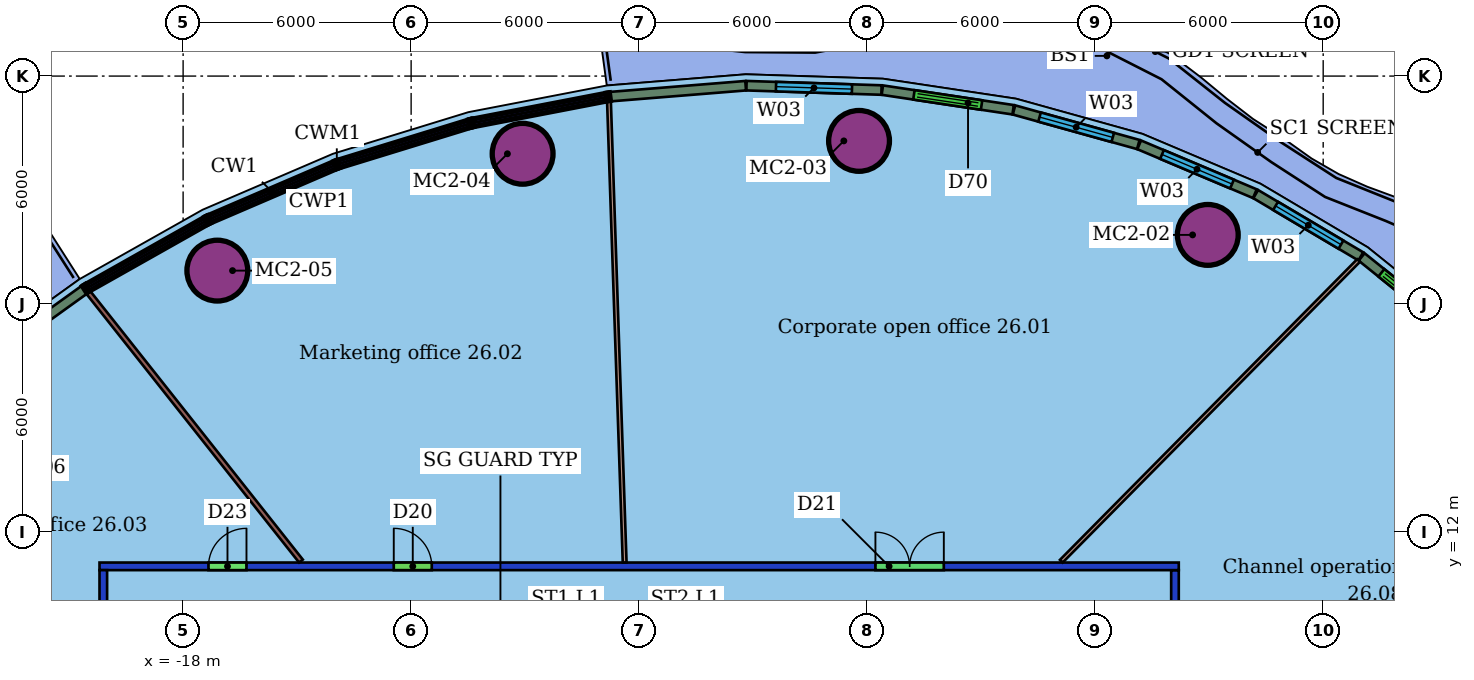
"""IFC4 building model, lengths in metres.
Left out: names, types, materials, properties, quantities, classifications, styles, units other than length and angle.
Written with IfcOpenShell. Run it as: python <this file> out.ifc"""

import sys

from ifc_helpers import new_model, si_unit, direction, frame, frame_2d, origin, origin_2d, place, context, subcontext, project, spatial, rectangle, hollow_circle, extrude, element, fill, save


model = new_model("IFC4")
c1 = context("Model", 3, precision=1e-05, world=origin(), true_north=direction((0.0, 1.0)))
c2 = subcontext(c1, "Body", "Model", "MODEL_VIEW")
j1 = project(units=[si_unit("LENGTHUNIT", "METRE"), si_unit("PLANEANGLEUNIT", "RADIAN")], contexts=[c1])
p1 = place(None, origin())
s1 = spatial("IfcSite", under=j1, at=p1, CompositionType="ELEMENT")
p2 = place(p1, origin())
s2 = spatial("IfcBuilding", under=s1, at=p2, CompositionType="ELEMENT")
p3 = place(p2, frame((0.0, 0.0, 113.8)))
s3 = spatial("IfcBuildingStorey", under=s2, at=p3, CompositionType="ELEMENT", Elevation=113.8)
for number, where, z_axis, x_axis in (
    (1, (8.963, 19.821, 0.0), (0.0, 0.0, 1.0), (1.0, 0.0, 0.0)),
    (2, (-0.213, 22.294, 0.0), (0.0, 0.0, 1.0), (1.0, 0.0, 0.0)),
    (3, (-9.066, 21.956, 0.0), (0.0, 0.0, 1.0), (1.0, 0.0, 0.0)),
    (4, (-17.1, 18.881, 0.0), (0.0, 0.0, 1.0), (1.0, 0.0, 0.0)),
):
    element("IfcColumn", number, at=place(p3, frame(where, z_axis=z_axis, x_axis=x_axis)), inside=s3, PredefinedType="COLUMN", context=c2, shape_type="SweptSolid", body=[
        extrude(hollow_circle(Radius=0.8, WallThickness=0.055, at=origin_2d()), origin(), (0.0, 0.0, 1.0), 3.45),
    ])
p4 = place(p3, frame((-20.1, -11.0, 0.0), z_axis=(0.0, 0.0, 1.0), x_axis=(0.0, 1.0, 0.0)))
e5 = element("IfcWall", 5, at=p4, inside=s3, PredefinedType="PARTITIONING", context=c2, shape_type="SweptSolid", body=[
    extrude(rectangle(XDim=22.0, YDim=0.2, at=frame_2d((11.0, 0.0))), origin(), (0.0, 0.0, 1.0), 3.0),
])
p5 = place(p4, frame((9.103, 0.0, 0.0)))
e6 = element("IfcOpeningElement", 6, at=p5, cuts=e5, PredefinedType="OPENING", context=c2, shape_type="SweptSolid", body=[
    extrude(rectangle(XDim=1.8, YDim=2.1, at=frame_2d((0.9, 1.05))), frame((0.0, 0.11, 0.0), z_axis=(0.0, -1.0, 0.0), x_axis=(1.0, 0.0, 0.0)), (0.0, 0.0, 1.0), 0.22),
])
p6 = place(p3, frame((-20.2, 11.1, 0.0), z_axis=(0.0, 0.0, 1.0), x_axis=(1.0, 0.0, 0.0)))
e7 = element("IfcWall", 7, at=p6, inside=s3, PredefinedType="PARTITIONING", context=c2, shape_type="SweptSolid", body=[
    extrude(rectangle(XDim=28.4, YDim=0.2, at=frame_2d((14.2, 0.0))), origin(), (0.0, 0.0, 1.0), 3.0),
])
p7 = place(p6, frame((20.417, 0.0, 0.0)))
e8 = element("IfcOpeningElement", 8, at=p7, cuts=e7, PredefinedType="OPENING", context=c2, shape_type="SweptSolid", body=[
    extrude(rectangle(XDim=1.8, YDim=2.1, at=frame_2d((0.9, 1.05))), frame((0.0, 0.11, 0.0), z_axis=(0.0, -1.0, 0.0), x_axis=(1.0, 0.0, 0.0)), (0.0, 0.0, 1.0), 0.22),
])
p8 = place(p6, frame((7.743, 0.0, 0.0)))
e9 = element("IfcOpeningElement", 9, at=p8, cuts=e7, PredefinedType="OPENING", context=c2, shape_type="SweptSolid", body=[
    extrude(rectangle(XDim=1.0, YDim=2.1, at=frame_2d((0.5, 1.05))), frame((0.0, 0.11, 0.0), z_axis=(0.0, -1.0, 0.0), x_axis=(1.0, 0.0, 0.0)), (0.0, 0.0, 1.0), 0.22),
])
p9 = place(p6, frame((2.867, 0.0, 0.0)))
e10 = element("IfcOpeningElement", 10, at=p9, cuts=e7, PredefinedType="OPENING", context=c2, shape_type="SweptSolid", body=[
    extrude(rectangle(XDim=1.0, YDim=2.4, at=frame_2d((0.5, 1.2))), frame((0.0, 0.11, 0.0), z_axis=(0.0, -1.0, 0.0), x_axis=(1.0, 0.0, 0.0)), (0.0, 0.0, 1.0), 0.22),
])
p10 = place(p3, frame((8.1, 11.0, 0.0), z_axis=(0.0, 0.0, 1.0), x_axis=(0.0, -1.0, 0.0)))
e11 = element("IfcWall", 11, at=p10, inside=s3, PredefinedType="PARTITIONING", context=c2, shape_type="SweptSolid", body=[
    extrude(rectangle(XDim=22.0, YDim=0.2, at=frame_2d((11.0, 0.0))), origin(), (0.0, 0.0, 1.0), 3.0),
])
p11 = place(p10, frame((10.26, 0.0, 0.0)))
e12 = element("IfcOpeningElement", 12, at=p11, cuts=e11, PredefinedType="OPENING", context=c2, shape_type="SweptSolid", body=[
    extrude(rectangle(XDim=1.8, YDim=2.1, at=frame_2d((0.9, 1.05))), frame((0.0, 0.11, 0.0), z_axis=(0.0, -1.0, 0.0), x_axis=(1.0, 0.0, 0.0)), (0.0, 0.0, 1.0), 0.22),
])
p12 = place(p10, frame((3.733, 0.0, 0.0)))
e13 = element("IfcOpeningElement", 13, at=p12, cuts=e11, PredefinedType="OPENING", context=c2, shape_type="SweptSolid", body=[
    extrude(rectangle(XDim=1.8, YDim=2.1, at=frame_2d((0.9, 1.05))), frame((0.0, 0.11, 0.0), z_axis=(0.0, -1.0, 0.0), x_axis=(1.0, 0.0, 0.0)), (0.0, 0.0, 1.0), 0.22),
])
p13 = place(p3, frame((12.93, 19.146, 0.0), z_axis=(0.0, 0.0, 1.0), x_axis=(-0.703090382433, -0.711100495099, 0.0)))
e14 = element("IfcWall", 14, at=p13, inside=s3, PredefinedType="PARTITIONING", context=c2, shape_type="SweptSolid", body=[
    extrude(rectangle(XDim=11.125, YDim=0.1, at=frame_2d((5.562, 0.0))), origin(), (0.0, 0.0, 1.0), 3.45),
])
p14 = place(p3, frame((-6.794, 23.331, 0.0), z_axis=(0.0, 0.0, 1.0), x_axis=(0.034016773765, -0.999421262083, 0.0)))
e15 = element("IfcWall", 15, at=p14, inside=s3, PredefinedType="PARTITIONING", context=c2, shape_type="SweptSolid", body=[
    extrude(rectangle(XDim=12.136, YDim=0.1, at=frame_2d((6.068, 0.0))), origin(), (0.0, 0.0, 1.0), 3.45),
])
p15 = place(p3, frame((-20.491, 18.302, 0.0), z_axis=(0.0, 0.0, 1.0), x_axis=(0.620744588947, -0.784012854036, 0.0)))
e16 = element("IfcWall", 16, at=p15, inside=s3, PredefinedType="PARTITIONING", context=c2, shape_type="SweptSolid", body=[
    extrude(rectangle(XDim=9.009, YDim=0.125, at=frame_2d((4.505, 0.0))), origin(), (0.0, 0.0, 1.0), 3.45),
])
p16 = place(p3, frame((-28.368, 11.17, 0.0), z_axis=(0.0, 0.0, 1.0), x_axis=(0.894647115325, -0.446773476205, 0.0)))
e17 = element("IfcWall", 17, at=p16, inside=s3, PredefinedType="PARTITIONING", context=c2, shape_type="SweptSolid", body=[
    extrude(rectangle(XDim=9.098, YDim=0.125, at=frame_2d((4.549, 0.0))), origin(), (0.0, 0.0, 1.0), 3.45),
])
p17 = place(p3, frame((15.453, 17.278, 0.0), z_axis=(0.0, 0.0, 1.0), x_axis=(-0.779353281229, 0.626584761256, 0.0)))
e18 = element("IfcWall", 18, at=p17, inside=s3, PredefinedType="SOLIDWALL", context=c2, shape_type="SweptSolid", body=[
    extrude(rectangle(XDim=3.132, YDim=0.25, at=frame_2d((1.566, 0.0))), origin(), (0.0, 0.0, 1.0), 3.05),
])
p18 = place(p17, frame((0.666, 0.0, 0.0)))
e19 = element("IfcOpeningElement", 19, at=p18, cuts=e18, PredefinedType="OPENING", context=c2, shape_type="SweptSolid", body=[
    extrude(rectangle(XDim=1.8, YDim=2.4, at=frame_2d((0.9, 1.2))), frame((0.0, 0.135, 0.0), z_axis=(0.0, -1.0, 0.0), x_axis=(1.0, 0.0, 0.0)), (0.0, 0.0, 1.0), 0.27),
])
p19 = place(p3, frame((12.99, 19.255, 0.0), z_axis=(0.0, 0.0, 1.0), x_axis=(-0.860327301237, 0.509742027644, 0.0)))
e20 = element("IfcWall", 20, at=p19, inside=s3, PredefinedType="SOLIDWALL", context=c2, shape_type="SweptSolid", body=[
    extrude(rectangle(XDim=3.215, YDim=0.25, at=frame_2d((1.607, 0.0))), origin(), (0.0, 0.0, 1.0), 3.05),
])
p20 = place(p19, frame((0.607, 0.0, 0.9)))
e21 = element("IfcOpeningElement", 21, at=p20, cuts=e20, PredefinedType="OPENING", context=c2, shape_type="SweptSolid", body=[
    extrude(rectangle(XDim=2.0, YDim=2.1, at=frame_2d((1.0, 1.05))), frame((0.0, 0.135, 0.0), z_axis=(0.0, -1.0, 0.0), x_axis=(1.0, 0.0, 0.0)), (0.0, 0.0, 1.0), 0.27),
])
p21 = place(p3, frame((10.202, 20.906, 0.0), z_axis=(0.0, 0.0, 1.0), x_axis=(-0.921226028589, 0.389027767967, 0.0)))
e22 = element("IfcWall", 22, at=p21, inside=s3, PredefinedType="SOLIDWALL", context=c2, shape_type="SweptSolid", body=[
    extrude(rectangle(XDim=3.305, YDim=0.25, at=frame_2d((1.652, 0.0))), origin(), (0.0, 0.0, 1.0), 3.05),
])
p22 = place(p21, frame((0.652, 0.0, 0.9)))
e23 = element("IfcOpeningElement", 23, at=p22, cuts=e22, PredefinedType="OPENING", context=c2, shape_type="SweptSolid", body=[
    extrude(rectangle(XDim=2.0, YDim=2.1, at=frame_2d((1.0, 1.05))), frame((0.0, 0.135, 0.0), z_axis=(0.0, -1.0, 0.0), x_axis=(1.0, 0.0, 0.0)), (0.0, 0.0, 1.0), 0.27),
])
p23 = place(p3, frame((7.135, 22.199, 0.0), z_axis=(0.0, 0.0, 1.0), x_axis=(-0.96343750938, 0.267933136285, 0.0)))
e24 = element("IfcWall", 24, at=p23, inside=s3, PredefinedType="SOLIDWALL", context=c2, shape_type="SweptSolid", body=[
    extrude(rectangle(XDim=3.395, YDim=0.25, at=frame_2d((1.698, 0.0))), origin(), (0.0, 0.0, 1.0), 3.05),
])
p24 = place(p23, frame((0.698, 0.0, 0.9)))
e25 = element("IfcOpeningElement", 25, at=p24, cuts=e24, PredefinedType="OPENING", context=c2, shape_type="SweptSolid", body=[
    extrude(rectangle(XDim=2.0, YDim=2.1, at=frame_2d((1.0, 1.05))), frame((0.0, 0.135, 0.0), z_axis=(0.0, -1.0, 0.0), x_axis=(1.0, 0.0, 0.0)), (0.0, 0.0, 1.0), 0.27),
])
p25 = place(p3, frame((3.841, 23.114, 0.0), z_axis=(0.0, 0.0, 1.0), x_axis=(-0.98891112558, 0.14850853748, 0.0)))
e26 = element("IfcWall", 26, at=p25, inside=s3, PredefinedType="SOLIDWALL", context=c2, shape_type="SweptSolid", body=[
    extrude(rectangle(XDim=3.48, YDim=0.25, at=frame_2d((1.74, 0.0))), origin(), (0.0, 0.0, 1.0), 3.05),
])
p26 = place(p25, frame((0.84, 0.0, 0.0)))
e27 = element("IfcOpeningElement", 27, at=p26, cuts=e26, PredefinedType="OPENING", context=c2, shape_type="SweptSolid", body=[
    extrude(rectangle(XDim=1.8, YDim=2.4, at=frame_2d((0.9, 1.2))), frame((0.0, 0.135, 0.0), z_axis=(0.0, -1.0, 0.0), x_axis=(1.0, 0.0, 0.0)), (0.0, 0.0, 1.0), 0.27),
])
p27 = place(p3, frame((0.377, 23.633, 0.0), z_axis=(0.0, 0.0, 1.0), x_axis=(-0.99948104208, 0.032212521216, 0.0)))
e28 = element("IfcWall", 28, at=p27, inside=s3, PredefinedType="SOLIDWALL", context=c2, shape_type="SweptSolid", body=[
    extrude(rectangle(XDim=3.555, YDim=0.25, at=frame_2d((1.777, 0.0))), origin(), (0.0, 0.0, 1.0), 3.05),
])
p28 = place(p27, frame((0.777, 0.0, 0.9)))
e29 = element("IfcOpeningElement", 29, at=p28, cuts=e28, PredefinedType="OPENING", context=c2, shape_type="SweptSolid", body=[
    extrude(rectangle(XDim=2.0, YDim=2.1, at=frame_2d((1.0, 1.05))), frame((0.0, 0.135, 0.0), z_axis=(0.0, -1.0, 0.0), x_axis=(1.0, 0.0, 0.0)), (0.0, 0.0, 1.0), 0.27),
])
p29 = place(p3, frame((-3.198, 23.747, 0.0), z_axis=(0.0, 0.0, 1.0), x_axis=(-0.996755199543, -0.080492684039, 0.0)))
e30 = element("IfcWall", 30, at=p29, inside=s3, PredefinedType="SOLIDWALL", context=c2, shape_type="SweptSolid", body=[
    extrude(rectangle(XDim=3.57, YDim=0.25, at=frame_2d((1.785, 0.0))), origin(), (0.0, 0.0, 1.0), 3.05),
])
p30 = place(p3, frame((-20.603, 18.375, 0.0), z_axis=(0.0, 0.0, 1.0), x_axis=(-0.812029550547, -0.583616320058, 0.0)))
e31 = element("IfcWall", 31, at=p30, inside=s3, PredefinedType="SOLIDWALL", context=c2, shape_type="SweptSolid", body=[
    extrude(rectangle(XDim=3.57, YDim=0.25, at=frame_2d((1.785, 0.0))), origin(), (0.0, 0.0, 1.0), 3.05),
])
p31 = place(p7, origin())
e32 = element("IfcDoor", 32, at=p31, inside=s3, OperationType="DOUBLE_DOOR_SINGLE_SWING", PredefinedType="DOOR", context=c2, shape_type="SweptSolid", body=[
    extrude(rectangle(XDim=1.8, YDim=2.1, at=frame_2d((0.9, 1.05))), frame((0.0, 0.025, 0.0), z_axis=(0.0, -1.0, 0.0), x_axis=(1.0, 0.0, 0.0)), (0.0, 0.0, 1.0), 0.05),
])
fill(e8, e32)
p32 = place(p8, origin())
e33 = element("IfcDoor", 33, at=p32, inside=s3, OperationType="SINGLE_SWING_LEFT", PredefinedType="DOOR", context=c2, shape_type="SweptSolid", body=[
    extrude(rectangle(XDim=1.0, YDim=2.1, at=frame_2d((0.5, 1.05))), frame((0.0, 0.025, 0.0), z_axis=(0.0, -1.0, 0.0), x_axis=(1.0, 0.0, 0.0)), (0.0, 0.0, 1.0), 0.05),
])
fill(e9, e33)
p33 = place(p9, origin())
e34 = element("IfcDoor", 34, at=p33, inside=s3, OperationType="SINGLE_SWING_RIGHT", PredefinedType="DOOR", context=c2, shape_type="SweptSolid", body=[
    extrude(rectangle(XDim=1.0, YDim=2.4, at=frame_2d((0.5, 1.2))), frame((0.0, 0.025, 0.0), z_axis=(0.0, -1.0, 0.0), x_axis=(1.0, 0.0, 0.0)), (0.0, 0.0, 1.0), 0.05),
])
fill(e10, e34)
p34 = place(p18, origin())
e35 = element("IfcDoor", 35, at=p34, inside=s3, OperationType="DOUBLE_DOOR_SLIDING", PredefinedType="DOOR", context=c2, shape_type="SweptSolid", body=[
    extrude(rectangle(XDim=1.8, YDim=2.4, at=frame_2d((0.9, 1.2))), frame((0.0, 0.025, 0.0), z_axis=(0.0, -1.0, 0.0), x_axis=(1.0, 0.0, 0.0)), (0.0, 0.0, 1.0), 0.05),
])
fill(e19, e35)
p35 = place(p20, origin())
e36 = element("IfcWindow", 36, at=p35, inside=s3, PartitioningType="SINGLE_PANEL", PredefinedType="WINDOW", context=c2, shape_type="SweptSolid", body=[
    extrude(rectangle(XDim=2.0, YDim=2.1, at=frame_2d((1.0, 1.05))), frame((0.0, 0.03, 0.0), z_axis=(0.0, -1.0, 0.0), x_axis=(1.0, 0.0, 0.0)), (0.0, 0.0, 1.0), 0.06),
])
fill(e21, e36)
p36 = place(p22, origin())
e37 = element("IfcWindow", 37, at=p36, inside=s3, PartitioningType="SINGLE_PANEL", PredefinedType="WINDOW", context=c2, shape_type="SweptSolid", body=[
    extrude(rectangle(XDim=2.0, YDim=2.1, at=frame_2d((1.0, 1.05))), frame((0.0, 0.03, 0.0), z_axis=(0.0, -1.0, 0.0), x_axis=(1.0, 0.0, 0.0)), (0.0, 0.0, 1.0), 0.06),
])
fill(e23, e37)
p37 = place(p24, origin())
e38 = element("IfcWindow", 38, at=p37, inside=s3, PartitioningType="SINGLE_PANEL", PredefinedType="WINDOW", context=c2, shape_type="SweptSolid", body=[
    extrude(rectangle(XDim=2.0, YDim=2.1, at=frame_2d((1.0, 1.05))), frame((0.0, 0.03, 0.0), z_axis=(0.0, -1.0, 0.0), x_axis=(1.0, 0.0, 0.0)), (0.0, 0.0, 1.0), 0.06),
])
fill(e25, e38)
p38 = place(p26, origin())
e39 = element("IfcDoor", 39, at=p38, inside=s3, OperationType="DOUBLE_DOOR_SLIDING", PredefinedType="DOOR", context=c2, shape_type="SweptSolid", body=[
    extrude(rectangle(XDim=1.8, YDim=2.4, at=frame_2d((0.9, 1.2))), frame((0.0, 0.025, 0.0), z_axis=(0.0, -1.0, 0.0), x_axis=(1.0, 0.0, 0.0)), (0.0, 0.0, 1.0), 0.05),
])
fill(e27, e39)
p39 = place(p28, origin())
e40 = element("IfcWindow", 40, at=p39, inside=s3, PartitioningType="SINGLE_PANEL", PredefinedType="WINDOW", context=c2, shape_type="SweptSolid", body=[
    extrude(rectangle(XDim=2.0, YDim=2.1, at=frame_2d((1.0, 1.05))), frame((0.0, 0.03, 0.0), z_axis=(0.0, -1.0, 0.0), x_axis=(1.0, 0.0, 0.0)), (0.0, 0.0, 1.0), 0.06),
])
fill(e29, e40)
save(model, sys.argv[1])
